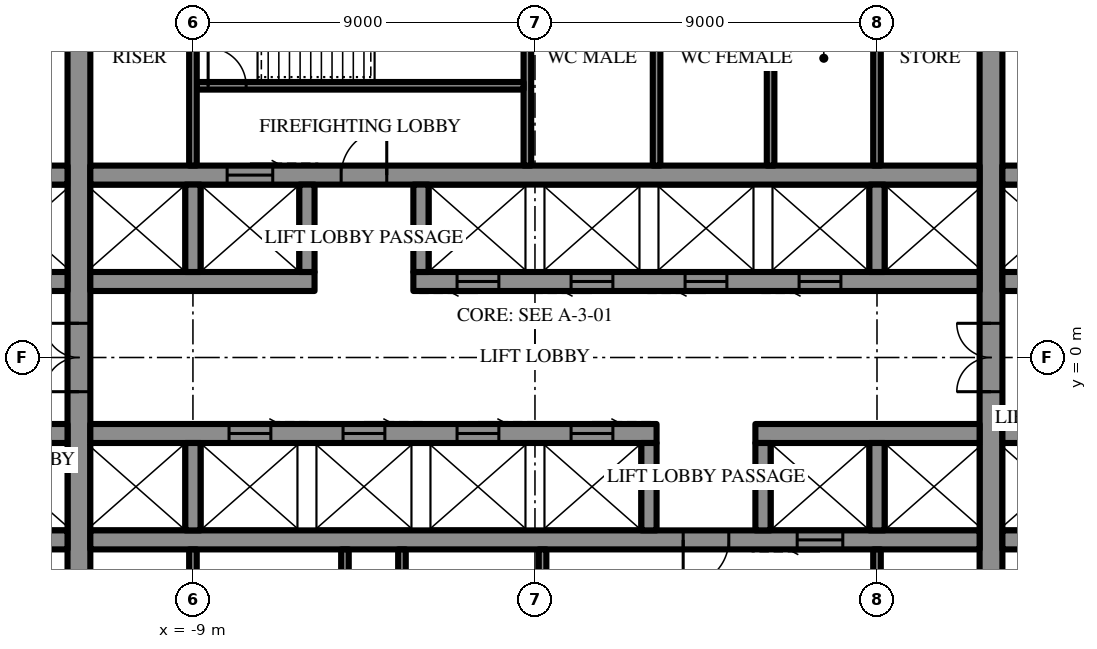
"""IFC4 building model, lengths in metres.
Left out: names, types, materials, properties, quantities, classifications, styles, units other than length and angle.
Written with IfcOpenShell. Run it as: python <this file> out.ifc"""

import sys

from ifc_helpers import new_model, si_unit, direction, frame, frame_2d, origin, place, context, subcontext, project, spatial, rectangle, extrude, element, fill, save


model = new_model("IFC4")
c1 = context("Model", 3, precision=1e-05, world=origin(), true_north=direction((0.0, 1.0)))
c2 = subcontext(c1, "Body", "Model", "MODEL_VIEW")
j1 = project(units=[si_unit("LENGTHUNIT", "METRE"), si_unit("PLANEANGLEUNIT", "RADIAN")], contexts=[c1])
p1 = place(None, origin())
s1 = spatial("IfcSite", under=j1, at=p1, CompositionType="ELEMENT")
p2 = place(p1, origin())
s2 = spatial("IfcBuilding", under=s1, at=p2, CompositionType="ELEMENT")
p3 = place(p2, frame((0.0, 0.0, 27.7)))
s3 = spatial("IfcBuildingStorey", under=s2, at=p3, CompositionType="ELEMENT", Elevation=27.7)
p4 = place(p3, frame((12.0, -10.7, 0.0), z_axis=(0.0, 0.0, 1.0), x_axis=(0.0, 1.0, 0.0)))
e1 = element("IfcWall", 1, at=p4, inside=s3, PredefinedType="SHEAR", context=c2, shape_type="SweptSolid", body=[
    extrude(rectangle(XDim=21.4, YDim=0.6, at=frame_2d((10.7, 0.0))), origin(), (0.0, 0.0, 1.0), 4.2),
])
p5 = place(p4, frame((9.8, 0.0, 0.0)))
e2 = element("IfcOpeningElement", 2, at=p5, cuts=e1, PredefinedType="OPENING", context=c2, shape_type="SweptSolid", body=[
    extrude(rectangle(XDim=1.8, YDim=2.4, at=frame_2d((0.9, 1.2))), frame((0.0, 0.31, 0.0), z_axis=(0.0, -1.0, 0.0), x_axis=(1.0, 0.0, 0.0)), (0.0, 0.0, 1.0), 0.62),
])
p6 = place(p3, frame((-12.0, -10.7, 0.0), z_axis=(0.0, 0.0, 1.0), x_axis=(0.0, 1.0, 0.0)))
e3 = element("IfcWall", 3, at=p6, inside=s3, PredefinedType="SHEAR", context=c2, shape_type="SweptSolid", body=[
    extrude(rectangle(XDim=21.4, YDim=0.6, at=frame_2d((10.7, 0.0))), origin(), (0.0, 0.0, 1.0), 4.2),
])
p7 = place(p6, frame((9.8, 0.0, 0.0)))
e4 = element("IfcOpeningElement", 4, at=p7, cuts=e3, PredefinedType="OPENING", context=c2, shape_type="SweptSolid", body=[
    extrude(rectangle(XDim=1.8, YDim=2.4, at=frame_2d((0.9, 1.2))), frame((0.0, 0.31, 0.0), z_axis=(0.0, -1.0, 0.0), x_axis=(1.0, 0.0, 0.0)), (0.0, 0.0, 1.0), 0.62),
])
p8 = place(p3, frame((-14.8, 2.0, 0.0), z_axis=(0.0, 0.0, 1.0), x_axis=(1.0, 0.0, 0.0)))
e5 = element("IfcWall", 5, at=p8, inside=s3, PredefinedType="SHEAR", context=c2, shape_type="SweptSolid", body=[
    extrude(rectangle(XDim=2.5, YDim=0.5, at=frame_2d((1.25, 0.0))), origin(), (0.0, 0.0, 1.0), 4.2),
])
p9 = place(p3, frame((-11.7, 2.0, 0.0), z_axis=(0.0, 0.0, 1.0), x_axis=(1.0, 0.0, 0.0)))
e6 = element("IfcWall", 6, at=p9, inside=s3, PredefinedType="SHEAR", context=c2, shape_type="SweptSolid", body=[
    extrude(rectangle(XDim=5.9, YDim=0.5, at=frame_2d((2.95, 0.0))), origin(), (0.0, 0.0, 1.0), 4.2),
])
p10 = place(p3, frame((-3.2, 2.0, 0.0), z_axis=(0.0, 0.0, 1.0), x_axis=(1.0, 0.0, 0.0)))
e7 = element("IfcWall", 7, at=p10, inside=s3, PredefinedType="SHEAR", context=c2, shape_type="SweptSolid", body=[
    extrude(rectangle(XDim=14.9, YDim=0.5, at=frame_2d((7.45, 0.0))), origin(), (0.0, 0.0, 1.0), 4.2),
])
p11 = place(p10, frame((1.15, 0.0, 0.0)))
e8 = element("IfcOpeningElement", 8, at=p11, cuts=e7, PredefinedType="OPENING", context=c2, shape_type="SweptSolid", body=[
    extrude(rectangle(XDim=1.1, YDim=2.2, at=frame_2d((0.55, 1.1))), frame((0.0, 0.26, 0.0), z_axis=(0.0, -1.0, 0.0), x_axis=(1.0, 0.0, 0.0)), (0.0, 0.0, 1.0), 0.52),
])
p12 = place(p10, frame((4.15, 0.0, 0.0)))
e9 = element("IfcOpeningElement", 9, at=p12, cuts=e7, PredefinedType="OPENING", context=c2, shape_type="SweptSolid", body=[
    extrude(rectangle(XDim=1.1, YDim=2.2, at=frame_2d((0.55, 1.1))), frame((0.0, 0.26, 0.0), z_axis=(0.0, -1.0, 0.0), x_axis=(1.0, 0.0, 0.0)), (0.0, 0.0, 1.0), 0.52),
])
p13 = place(p10, frame((7.15, 0.0, 0.0)))
e10 = element("IfcOpeningElement", 10, at=p13, cuts=e7, PredefinedType="OPENING", context=c2, shape_type="SweptSolid", body=[
    extrude(rectangle(XDim=1.1, YDim=2.2, at=frame_2d((0.55, 1.1))), frame((0.0, 0.26, 0.0), z_axis=(0.0, -1.0, 0.0), x_axis=(1.0, 0.0, 0.0)), (0.0, 0.0, 1.0), 0.52),
])
p14 = place(p10, frame((10.15, 0.0, 0.0)))
e11 = element("IfcOpeningElement", 11, at=p14, cuts=e7, PredefinedType="OPENING", context=c2, shape_type="SweptSolid", body=[
    extrude(rectangle(XDim=1.1, YDim=2.2, at=frame_2d((0.55, 1.1))), frame((0.0, 0.26, 0.0), z_axis=(0.0, -1.0, 0.0), x_axis=(1.0, 0.0, 0.0)), (0.0, 0.0, 1.0), 0.52),
])
for number, where, z_axis, x_axis in (
    (12, (12.3, 2.0, 0.0), (0.0, 0.0, 1.0), (1.0, 0.0, 0.0)),
    (13, (-14.8, 4.8, 0.0), (0.0, 0.0, 1.0), (1.0, 0.0, 0.0)),
):
    element("IfcWall", number, at=place(p3, frame(where, z_axis=z_axis, x_axis=x_axis)), inside=s3, PredefinedType="SHEAR", context=c2, shape_type="SweptSolid", body=[
        extrude(rectangle(XDim=2.5, YDim=0.5, at=frame_2d((1.25, 0.0))), origin(), (0.0, 0.0, 1.0), 4.2),
    ])
p15 = place(p3, frame((-11.7, 4.8, 0.0), z_axis=(0.0, 0.0, 1.0), x_axis=(1.0, 0.0, 0.0)))
e14 = element("IfcWall", 14, at=p15, inside=s3, PredefinedType="SHEAR", context=c2, shape_type="SweptSolid", body=[
    extrude(rectangle(XDim=23.4, YDim=0.5, at=frame_2d((11.7, 0.0))), origin(), (0.0, 0.0, 1.0), 4.2),
])
p16 = place(p15, frame((6.6, 0.0, 0.0)))
e15 = element("IfcOpeningElement", 15, at=p16, cuts=e14, PredefinedType="OPENING", context=c2, shape_type="SweptSolid", body=[
    extrude(rectangle(XDim=1.2, YDim=2.2, at=frame_2d((0.6, 1.1))), frame((0.0, 0.26, 0.0), z_axis=(0.0, -1.0, 0.0), x_axis=(1.0, 0.0, 0.0)), (0.0, 0.0, 1.0), 0.52),
])
p17 = place(p15, frame((3.6, 0.0, 0.0)))
e16 = element("IfcOpeningElement", 16, at=p17, cuts=e14, PredefinedType="OPENING", context=c2, shape_type="SweptSolid", body=[
    extrude(rectangle(XDim=1.2, YDim=2.2, at=frame_2d((0.6, 1.1))), frame((0.0, 0.26, 0.0), z_axis=(0.0, -1.0, 0.0), x_axis=(1.0, 0.0, 0.0)), (0.0, 0.0, 1.0), 0.52),
])
p18 = place(p3, frame((12.3, 4.8, 0.0), z_axis=(0.0, 0.0, 1.0), x_axis=(1.0, 0.0, 0.0)))
e17 = element("IfcWall", 17, at=p18, inside=s3, PredefinedType="SHEAR", context=c2, shape_type="SweptSolid", body=[
    extrude(rectangle(XDim=2.5, YDim=0.5, at=frame_2d((1.25, 0.0))), origin(), (0.0, 0.0, 1.0), 4.2),
])
for number, where, z_axis, x_axis in (
    (18, (-9.0, 2.25, 0.0), (0.0, 0.0, 1.0), (0.0, 1.0, 0.0)),
    (19, (-6.0, 2.25, 0.0), (0.0, 0.0, 1.0), (0.0, 1.0, 0.0)),
    (20, (-3.0, 2.25, 0.0), (0.0, 0.0, 1.0), (0.0, 1.0, 0.0)),
    (21, (9.0, 2.25, 0.0), (0.0, 0.0, 1.0), (0.0, 1.0, 0.0)),
):
    element("IfcWall", number, at=place(p3, frame(where, z_axis=z_axis, x_axis=x_axis)), inside=s3, PredefinedType="SHEAR", context=c2, shape_type="SweptSolid", body=[
        extrude(rectangle(XDim=2.3, YDim=0.4, at=frame_2d((1.15, 0.0))), origin(), (0.0, 0.0, 1.0), 4.2),
    ])
p19 = place(p3, frame((-0.2, 5.05, 0.0), z_axis=(0.0, 0.0, 1.0), x_axis=(0.0, 1.0, 0.0)))
e22 = element("IfcWall", 22, at=p19, inside=s3, PredefinedType="SHEAR", context=c2, shape_type="SweptSolid", body=[
    extrude(rectangle(XDim=5.65, YDim=0.2, at=frame_2d((2.825, 0.0))), origin(), (0.0, 0.0, 1.0), 4.2),
])
p20 = place(p3, frame((-8.9, 7.15, 0.0), z_axis=(0.0, 0.0, 1.0), x_axis=(1.0, 0.0, 0.0)))
e23 = element("IfcWall", 23, at=p20, inside=s3, PredefinedType="SHEAR", context=c2, shape_type="SweptSolid", body=[
    extrude(rectangle(XDim=8.6, YDim=0.2, at=frame_2d((4.3, 0.0))), origin(), (0.0, 0.0, 1.0), 4.2),
])
p21 = place(p20, frame((0.3, 0.0, 0.0)))
e24 = element("IfcOpeningElement", 24, at=p21, cuts=e23, PredefinedType="OPENING", context=c2, shape_type="SweptSolid", body=[
    extrude(rectangle(XDim=1.0, YDim=2.2, at=frame_2d((0.5, 1.1))), frame((0.0, 0.11, 0.0), z_axis=(0.0, -1.0, 0.0), x_axis=(1.0, 0.0, 0.0)), (0.0, 0.0, 1.0), 0.22),
])
p22 = place(p3, frame((14.8, -2.0, 0.0), z_axis=(0.0, 0.0, 1.0), x_axis=(-1.0, 0.0, 0.0)))
e25 = element("IfcWall", 25, at=p22, inside=s3, PredefinedType="SHEAR", context=c2, shape_type="SweptSolid", body=[
    extrude(rectangle(XDim=2.5, YDim=0.5, at=frame_2d((1.25, 0.0))), origin(), (0.0, 0.0, 1.0), 4.2),
])
p23 = place(p3, frame((11.7, -2.0, 0.0), z_axis=(0.0, 0.0, 1.0), x_axis=(-1.0, 0.0, 0.0)))
e26 = element("IfcWall", 26, at=p23, inside=s3, PredefinedType="SHEAR", context=c2, shape_type="SweptSolid", body=[
    extrude(rectangle(XDim=5.9, YDim=0.5, at=frame_2d((2.95, 0.0))), origin(), (0.0, 0.0, 1.0), 4.2),
])
p24 = place(p3, frame((3.2, -2.0, 0.0), z_axis=(0.0, 0.0, 1.0), x_axis=(-1.0, 0.0, 0.0)))
e27 = element("IfcWall", 27, at=p24, inside=s3, PredefinedType="SHEAR", context=c2, shape_type="SweptSolid", body=[
    extrude(rectangle(XDim=14.9, YDim=0.5, at=frame_2d((7.45, 0.0))), origin(), (0.0, 0.0, 1.0), 4.2),
])
p25 = place(p24, frame((1.15, 0.0, 0.0)))
e28 = element("IfcOpeningElement", 28, at=p25, cuts=e27, PredefinedType="OPENING", context=c2, shape_type="SweptSolid", body=[
    extrude(rectangle(XDim=1.1, YDim=2.2, at=frame_2d((0.55, 1.1))), frame((0.0, 0.26, 0.0), z_axis=(0.0, -1.0, 0.0), x_axis=(1.0, 0.0, 0.0)), (0.0, 0.0, 1.0), 0.52),
])
p26 = place(p24, frame((4.15, 0.0, 0.0)))
e29 = element("IfcOpeningElement", 29, at=p26, cuts=e27, PredefinedType="OPENING", context=c2, shape_type="SweptSolid", body=[
    extrude(rectangle(XDim=1.1, YDim=2.2, at=frame_2d((0.55, 1.1))), frame((0.0, 0.26, 0.0), z_axis=(0.0, -1.0, 0.0), x_axis=(1.0, 0.0, 0.0)), (0.0, 0.0, 1.0), 0.52),
])
p27 = place(p24, frame((7.15, 0.0, 0.0)))
e30 = element("IfcOpeningElement", 30, at=p27, cuts=e27, PredefinedType="OPENING", context=c2, shape_type="SweptSolid", body=[
    extrude(rectangle(XDim=1.1, YDim=2.2, at=frame_2d((0.55, 1.1))), frame((0.0, 0.26, 0.0), z_axis=(0.0, -1.0, 0.0), x_axis=(1.0, 0.0, 0.0)), (0.0, 0.0, 1.0), 0.52),
])
p28 = place(p24, frame((10.15, 0.0, 0.0)))
e31 = element("IfcOpeningElement", 31, at=p28, cuts=e27, PredefinedType="OPENING", context=c2, shape_type="SweptSolid", body=[
    extrude(rectangle(XDim=1.1, YDim=2.2, at=frame_2d((0.55, 1.1))), frame((0.0, 0.26, 0.0), z_axis=(0.0, -1.0, 0.0), x_axis=(1.0, 0.0, 0.0)), (0.0, 0.0, 1.0), 0.52),
])
for number, where, z_axis, x_axis in (
    (32, (-12.3, -2.0, 0.0), (0.0, 0.0, 1.0), (-1.0, 0.0, 0.0)),
    (33, (14.8, -4.8, 0.0), (0.0, 0.0, 1.0), (-1.0, 0.0, 0.0)),
):
    element("IfcWall", number, at=place(p3, frame(where, z_axis=z_axis, x_axis=x_axis)), inside=s3, PredefinedType="SHEAR", context=c2, shape_type="SweptSolid", body=[
        extrude(rectangle(XDim=2.5, YDim=0.5, at=frame_2d((1.25, 0.0))), origin(), (0.0, 0.0, 1.0), 4.2),
    ])
p29 = place(p3, frame((11.7, -4.8, 0.0), z_axis=(0.0, 0.0, 1.0), x_axis=(-1.0, 0.0, 0.0)))
e34 = element("IfcWall", 34, at=p29, inside=s3, PredefinedType="SHEAR", context=c2, shape_type="SweptSolid", body=[
    extrude(rectangle(XDim=23.4, YDim=0.5, at=frame_2d((11.7, 0.0))), origin(), (0.0, 0.0, 1.0), 4.2),
])
p30 = place(p29, frame((6.6, 0.0, 0.0)))
e35 = element("IfcOpeningElement", 35, at=p30, cuts=e34, PredefinedType="OPENING", context=c2, shape_type="SweptSolid", body=[
    extrude(rectangle(XDim=1.2, YDim=2.2, at=frame_2d((0.6, 1.1))), frame((0.0, 0.26, 0.0), z_axis=(0.0, -1.0, 0.0), x_axis=(1.0, 0.0, 0.0)), (0.0, 0.0, 1.0), 0.52),
])
p31 = place(p29, frame((3.6, 0.0, 0.0)))
e36 = element("IfcOpeningElement", 36, at=p31, cuts=e34, PredefinedType="OPENING", context=c2, shape_type="SweptSolid", body=[
    extrude(rectangle(XDim=1.2, YDim=2.2, at=frame_2d((0.6, 1.1))), frame((0.0, 0.26, 0.0), z_axis=(0.0, -1.0, 0.0), x_axis=(1.0, 0.0, 0.0)), (0.0, 0.0, 1.0), 0.52),
])
p32 = place(p3, frame((-12.3, -4.8, 0.0), z_axis=(0.0, 0.0, 1.0), x_axis=(-1.0, 0.0, 0.0)))
e37 = element("IfcWall", 37, at=p32, inside=s3, PredefinedType="SHEAR", context=c2, shape_type="SweptSolid", body=[
    extrude(rectangle(XDim=2.5, YDim=0.5, at=frame_2d((1.25, 0.0))), origin(), (0.0, 0.0, 1.0), 4.2),
])
for number, where, z_axis, x_axis in (
    (38, (9.0, -2.25, 0.0), (0.0, 0.0, 1.0), (0.0, -1.0, 0.0)),
    (39, (6.0, -2.25, 0.0), (0.0, 0.0, 1.0), (0.0, -1.0, 0.0)),
    (40, (3.0, -2.25, 0.0), (0.0, 0.0, 1.0), (0.0, -1.0, 0.0)),
    (41, (-9.0, -2.25, 0.0), (0.0, 0.0, 1.0), (0.0, -1.0, 0.0)),
):
    element("IfcWall", number, at=place(p3, frame(where, z_axis=z_axis, x_axis=x_axis)), inside=s3, PredefinedType="SHEAR", context=c2, shape_type="SweptSolid", body=[
        extrude(rectangle(XDim=2.3, YDim=0.4, at=frame_2d((1.15, 0.0))), origin(), (0.0, 0.0, 1.0), 4.2),
    ])
p33 = place(p3, frame((0.2, -5.05, 0.0), z_axis=(0.0, 0.0, 1.0), x_axis=(0.0, -1.0, 0.0)))
e42 = element("IfcWall", 42, at=p33, inside=s3, PredefinedType="SHEAR", context=c2, shape_type="SweptSolid", body=[
    extrude(rectangle(XDim=5.65, YDim=0.2, at=frame_2d((2.825, 0.0))), origin(), (0.0, 0.0, 1.0), 4.2),
])
for number, where, z_axis, x_axis in (
    (43, (-9.0, 5.05, 0.0), (0.0, 0.0, 1.0), (0.0, 1.0, 0.0)),
    (44, (9.0, 5.05, 0.0), (0.0, 0.0, 1.0), (0.0, 1.0, 0.0)),
    (45, (3.2, 5.05, 0.0), (0.0, 0.0, 1.0), (0.0, 1.0, 0.0)),
    (46, (6.2, 5.05, 0.0), (0.0, 0.0, 1.0), (0.0, 1.0, 0.0)),
    (47, (9.0, -5.05, 0.0), (0.0, 0.0, 1.0), (0.0, -1.0, 0.0)),
    (48, (-9.0, -5.05, 0.0), (0.0, 0.0, 1.0), (0.0, -1.0, 0.0)),
    (49, (-3.5, -5.05, 0.0), (0.0, 0.0, 1.0), (0.0, -1.0, 0.0)),
    (50, (-5.0, -5.05, 0.0), (0.0, 0.0, 1.0), (0.0, -1.0, 0.0)),
):
    element("IfcWall", number, at=place(p3, frame(where, z_axis=z_axis, x_axis=x_axis)), inside=s3, PredefinedType="PARTITIONING", context=c2, shape_type="SweptSolid", body=[
        extrude(rectangle(XDim=5.65, YDim=0.2, at=frame_2d((2.825, 0.0))), origin(), (0.0, 0.0, 1.0), 4.0),
    ])
p34 = place(p16, origin())
e51 = element("IfcDoor", 51, at=p34, inside=s3, OperationType="SINGLE_SWING_LEFT", PredefinedType="DOOR", context=c2, shape_type="SweptSolid", body=[
    extrude(rectangle(XDim=1.2, YDim=2.2, at=frame_2d((0.6, 1.1))), frame((0.0, 0.025, 0.0), z_axis=(0.0, -1.0, 0.0), x_axis=(1.0, 0.0, 0.0)), (0.0, 0.0, 1.0), 0.05),
])
fill(e15, e51)
p35 = place(p21, origin())
e52 = element("IfcDoor", 52, at=p35, inside=s3, OperationType="SINGLE_SWING_RIGHT", PredefinedType="DOOR", context=c2, shape_type="SweptSolid", body=[
    extrude(rectangle(XDim=1.0, YDim=2.2, at=frame_2d((0.5, 1.1))), frame((0.0, 0.025, 0.0), z_axis=(0.0, -1.0, 0.0), x_axis=(1.0, 0.0, 0.0)), (0.0, 0.0, 1.0), 0.05),
])
fill(e24, e52)
p36 = place(p30, origin())
e53 = element("IfcDoor", 53, at=p36, inside=s3, OperationType="SINGLE_SWING_LEFT", PredefinedType="DOOR", context=c2, shape_type="SweptSolid", body=[
    extrude(rectangle(XDim=1.2, YDim=2.2, at=frame_2d((0.6, 1.1))), frame((0.0, 0.025, 0.0), z_axis=(0.0, -1.0, 0.0), x_axis=(1.0, 0.0, 0.0)), (0.0, 0.0, 1.0), 0.05),
])
fill(e35, e53)
p37 = place(p5, origin())
e54 = element("IfcDoor", 54, at=p37, inside=s3, OperationType="DOUBLE_DOOR_SINGLE_SWING", PredefinedType="DOOR", context=c2, shape_type="SweptSolid", body=[
    extrude(rectangle(XDim=1.8, YDim=2.4, at=frame_2d((0.9, 1.2))), frame((0.0, 0.025, 0.0), z_axis=(0.0, -1.0, 0.0), x_axis=(1.0, 0.0, 0.0)), (0.0, 0.0, 1.0), 0.05),
])
fill(e2, e54)
p38 = place(p7, origin())
e55 = element("IfcDoor", 55, at=p38, inside=s3, OperationType="DOUBLE_DOOR_SINGLE_SWING", PredefinedType="DOOR", context=c2, shape_type="SweptSolid", body=[
    extrude(rectangle(XDim=1.8, YDim=2.4, at=frame_2d((0.9, 1.2))), frame((0.0, 0.025, 0.0), z_axis=(0.0, -1.0, 0.0), x_axis=(1.0, 0.0, 0.0)), (0.0, 0.0, 1.0), 0.05),
])
fill(e4, e55)
p39 = place(p17, origin())
e56 = element("IfcDoor", 56, at=p39, inside=s3, OperationType="SLIDING_TO_LEFT", PredefinedType="DOOR", context=c2, shape_type="SweptSolid", body=[
    extrude(rectangle(XDim=1.2, YDim=2.2, at=frame_2d((0.6, 1.1))), frame((0.0, 0.025, 0.0), z_axis=(0.0, -1.0, 0.0), x_axis=(1.0, 0.0, 0.0)), (0.0, 0.0, 1.0), 0.05),
])
fill(e16, e56)
p40 = place(p11, frame((1.1, 0.0, 0.0), z_axis=(0.0, 0.0, 1.0), x_axis=(-1.0, 0.0, 0.0)))
e57 = element("IfcDoor", 57, at=p40, inside=s3, OperationType="SLIDING_TO_LEFT", PredefinedType="DOOR", context=c2, shape_type="SweptSolid", body=[
    extrude(rectangle(XDim=1.1, YDim=2.2, at=frame_2d((0.55, 1.1))), frame((0.0, 0.025, 0.0), z_axis=(0.0, -1.0, 0.0), x_axis=(1.0, 0.0, 0.0)), (0.0, 0.0, 1.0), 0.05),
])
fill(e8, e57)
p41 = place(p12, frame((1.1, 0.0, 0.0), z_axis=(0.0, 0.0, 1.0), x_axis=(-1.0, 0.0, 0.0)))
e58 = element("IfcDoor", 58, at=p41, inside=s3, OperationType="SLIDING_TO_LEFT", PredefinedType="DOOR", context=c2, shape_type="SweptSolid", body=[
    extrude(rectangle(XDim=1.1, YDim=2.2, at=frame_2d((0.55, 1.1))), frame((0.0, 0.025, 0.0), z_axis=(0.0, -1.0, 0.0), x_axis=(1.0, 0.0, 0.0)), (0.0, 0.0, 1.0), 0.05),
])
fill(e9, e58)
p42 = place(p13, frame((1.1, 0.0, 0.0), z_axis=(0.0, 0.0, 1.0), x_axis=(-1.0, 0.0, 0.0)))
e59 = element("IfcDoor", 59, at=p42, inside=s3, OperationType="SLIDING_TO_LEFT", PredefinedType="DOOR", context=c2, shape_type="SweptSolid", body=[
    extrude(rectangle(XDim=1.1, YDim=2.2, at=frame_2d((0.55, 1.1))), frame((0.0, 0.025, 0.0), z_axis=(0.0, -1.0, 0.0), x_axis=(1.0, 0.0, 0.0)), (0.0, 0.0, 1.0), 0.05),
])
fill(e10, e59)
p43 = place(p14, frame((1.1, 0.0, 0.0), z_axis=(0.0, 0.0, 1.0), x_axis=(-1.0, 0.0, 0.0)))
e60 = element("IfcDoor", 60, at=p43, inside=s3, OperationType="SLIDING_TO_LEFT", PredefinedType="DOOR", context=c2, shape_type="SweptSolid", body=[
    extrude(rectangle(XDim=1.1, YDim=2.2, at=frame_2d((0.55, 1.1))), frame((0.0, 0.025, 0.0), z_axis=(0.0, -1.0, 0.0), x_axis=(1.0, 0.0, 0.0)), (0.0, 0.0, 1.0), 0.05),
])
fill(e11, e60)
p44 = place(p31, origin())
e61 = element("IfcDoor", 61, at=p44, inside=s3, OperationType="SLIDING_TO_LEFT", PredefinedType="DOOR", context=c2, shape_type="SweptSolid", body=[
    extrude(rectangle(XDim=1.2, YDim=2.2, at=frame_2d((0.6, 1.1))), frame((0.0, 0.025, 0.0), z_axis=(0.0, -1.0, 0.0), x_axis=(1.0, 0.0, 0.0)), (0.0, 0.0, 1.0), 0.05),
])
fill(e36, e61)
p45 = place(p25, frame((1.1, 0.0, 0.0), z_axis=(0.0, 0.0, 1.0), x_axis=(-1.0, 0.0, 0.0)))
e62 = element("IfcDoor", 62, at=p45, inside=s3, OperationType="SLIDING_TO_LEFT", PredefinedType="DOOR", context=c2, shape_type="SweptSolid", body=[
    extrude(rectangle(XDim=1.1, YDim=2.2, at=frame_2d((0.55, 1.1))), frame((0.0, 0.025, 0.0), z_axis=(0.0, -1.0, 0.0), x_axis=(1.0, 0.0, 0.0)), (0.0, 0.0, 1.0), 0.05),
])
fill(e28, e62)
p46 = place(p26, frame((1.1, 0.0, 0.0), z_axis=(0.0, 0.0, 1.0), x_axis=(-1.0, 0.0, 0.0)))
e63 = element("IfcDoor", 63, at=p46, inside=s3, OperationType="SLIDING_TO_LEFT", PredefinedType="DOOR", context=c2, shape_type="SweptSolid", body=[
    extrude(rectangle(XDim=1.1, YDim=2.2, at=frame_2d((0.55, 1.1))), frame((0.0, 0.025, 0.0), z_axis=(0.0, -1.0, 0.0), x_axis=(1.0, 0.0, 0.0)), (0.0, 0.0, 1.0), 0.05),
])
fill(e29, e63)
p47 = place(p27, frame((1.1, 0.0, 0.0), z_axis=(0.0, 0.0, 1.0), x_axis=(-1.0, 0.0, 0.0)))
e64 = element("IfcDoor", 64, at=p47, inside=s3, OperationType="SLIDING_TO_LEFT", PredefinedType="DOOR", context=c2, shape_type="SweptSolid", body=[
    extrude(rectangle(XDim=1.1, YDim=2.2, at=frame_2d((0.55, 1.1))), frame((0.0, 0.025, 0.0), z_axis=(0.0, -1.0, 0.0), x_axis=(1.0, 0.0, 0.0)), (0.0, 0.0, 1.0), 0.05),
])
fill(e30, e64)
p48 = place(p28, frame((1.1, 0.0, 0.0), z_axis=(0.0, 0.0, 1.0), x_axis=(-1.0, 0.0, 0.0)))
e65 = element("IfcDoor", 65, at=p48, inside=s3, OperationType="SLIDING_TO_LEFT", PredefinedType="DOOR", context=c2, shape_type="SweptSolid", body=[
    extrude(rectangle(XDim=1.1, YDim=2.2, at=frame_2d((0.55, 1.1))), frame((0.0, 0.025, 0.0), z_axis=(0.0, -1.0, 0.0), x_axis=(1.0, 0.0, 0.0)), (0.0, 0.0, 1.0), 0.05),
])
fill(e31, e65)
save(model, sys.argv[1])
